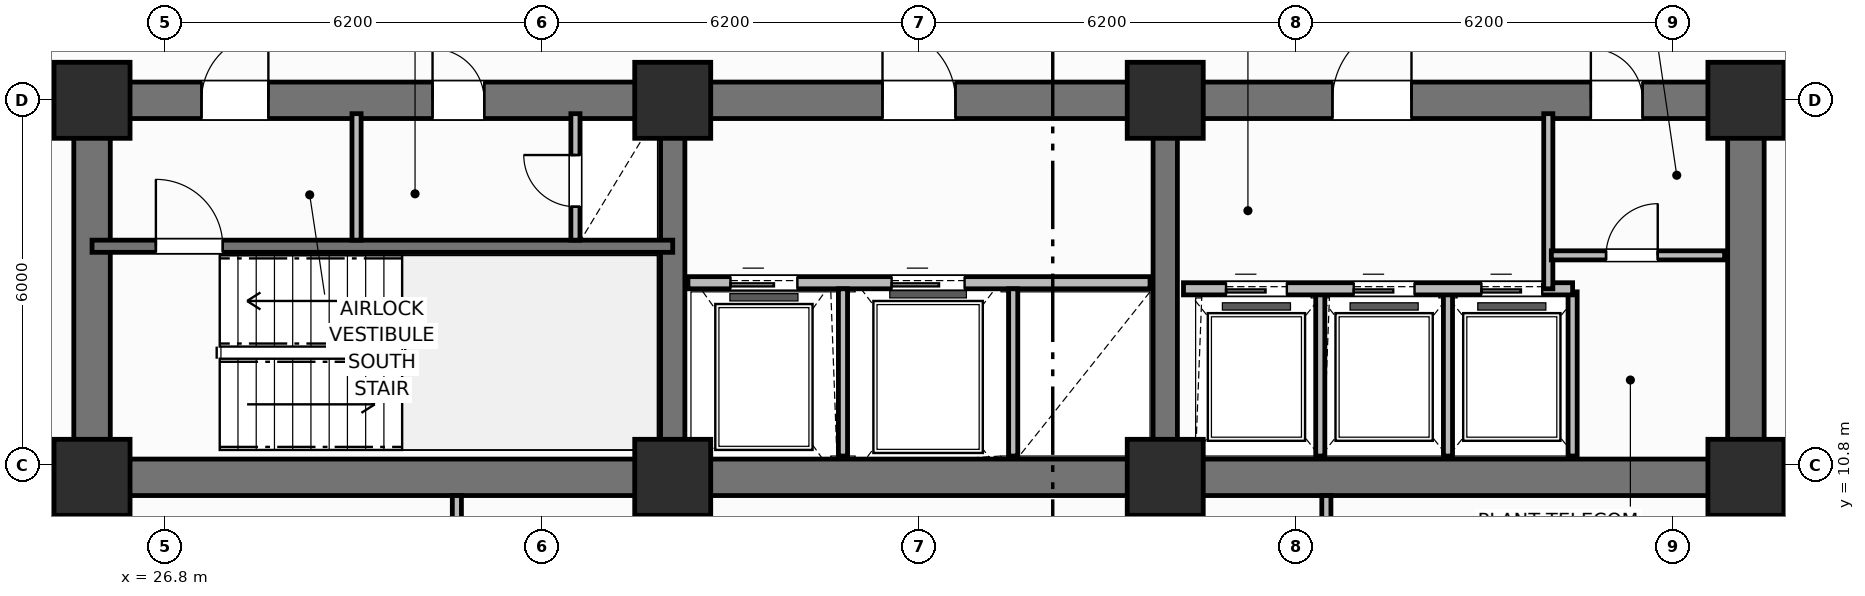
"""IFC4 building model, lengths in metres.
Left out: names, types, materials, properties, quantities, classifications, styles, units other than length and angle.
Written with IfcOpenShell. Run it as: python <this file> out.ifc"""

import sys

from ifc_helpers import new_model, si_unit, direction, frame, frame_2d, origin, origin_2d, place, context, subcontext, project, spatial, rectangle, extrude, element, fill, save


model = new_model("IFC4")
c1 = context("Model", 3, precision=1e-05, world=origin(), true_north=direction((0.0, 1.0)))
c2 = subcontext(c1, "Body", "Model", "MODEL_VIEW")
j1 = project(units=[si_unit("LENGTHUNIT", "METRE"), si_unit("PLANEANGLEUNIT", "RADIAN")], contexts=[c1])
p1 = place(None, origin())
s1 = spatial("IfcSite", under=j1, at=p1, CompositionType="ELEMENT")
p2 = place(p1, origin())
s2 = spatial("IfcBuilding", under=s1, at=p2, CompositionType="ELEMENT")
p3 = place(p2, frame((0.0, 0.0, 54.7)))
s3 = spatial("IfcBuildingStorey", under=s2, at=p3, CompositionType="ELEMENT", Elevation=54.7)
p4 = place(p3, frame((52.8, 10.6, 0.0), z_axis=(0.0, 0.0, 1.0), x_axis=(-1.0, 0.0, 0.0)))
e1 = element("IfcWall", 1, at=p4, inside=s3, PredefinedType="SHEAR", context=c2, shape_type="SweptSolid", body=[
    extrude(rectangle(XDim=27.2, YDim=0.6, at=frame_2d((13.6, 0.0))), origin(), (0.0, 0.0, 1.0), 3.7),
])
for number, where, z_axis, x_axis in (
    (2, (25.6, 10.9, 0.0), (0.0, 0.0, 1.0), (0.0, 1.0, 0.0)),
    (3, (52.8, 10.9, 0.0), (0.0, 0.0, 1.0), (0.0, 1.0, 0.0)),
):
    element("IfcWall", number, at=place(p3, frame(where, z_axis=z_axis, x_axis=x_axis)), inside=s3, PredefinedType="SHEAR", context=c2, shape_type="SweptSolid", body=[
        extrude(rectangle(XDim=5.6, YDim=0.6, at=frame_2d((2.8, 0.0))), origin(), (0.0, 0.0, 1.0), 3.7),
    ])
p5 = place(p3, frame((25.6, 16.8, 0.0), z_axis=(0.0, 0.0, 1.0), x_axis=(1.0, 0.0, 0.0)))
e4 = element("IfcWall", 4, at=p5, inside=s3, PredefinedType="SHEAR", context=c2, shape_type="SweptSolid", body=[
    extrude(rectangle(XDim=27.2, YDim=0.6, at=frame_2d((13.6, 0.0))), origin(), (0.0, 0.0, 1.0), 3.7),
])
p6 = place(p5, frame((1.8, 0.0, 0.0)))
e5 = element("IfcOpeningElement", 5, at=p6, cuts=e4, PredefinedType="OPENING", context=c2, shape_type="SweptSolid", body=[
    extrude(rectangle(XDim=1.1, YDim=2.15, at=frame_2d((0.55, 1.075))), frame((0.0, 0.31, 0.0), z_axis=(0.0, -1.0, 0.0), x_axis=(1.0, 0.0, 0.0)), (0.0, 0.0, 1.0), 0.62),
])
p7 = place(p5, frame((5.6, 0.0, 0.0)))
e6 = element("IfcOpeningElement", 6, at=p7, cuts=e4, PredefinedType="OPENING", context=c2, shape_type="SweptSolid", body=[
    extrude(rectangle(XDim=0.85, YDim=2.1, at=frame_2d((0.425, 1.05))), frame((0.0, 0.31, 0.0), z_axis=(0.0, -1.0, 0.0), x_axis=(1.0, 0.0, 0.0)), (0.0, 0.0, 1.0), 0.62),
])
p8 = place(p5, frame((13.0, 0.0, 0.0)))
e7 = element("IfcOpeningElement", 7, at=p8, cuts=e4, PredefinedType="OPENING", context=c2, shape_type="SweptSolid", body=[
    extrude(rectangle(XDim=1.2, YDim=2.15, at=frame_2d((0.6, 1.075))), frame((0.0, 0.31, 0.0), z_axis=(0.0, -1.0, 0.0), x_axis=(1.0, 0.0, 0.0)), (0.0, 0.0, 1.0), 0.62),
])
p9 = place(p5, frame((20.4, 0.0, 0.0)))
e8 = element("IfcOpeningElement", 8, at=p9, cuts=e4, PredefinedType="OPENING", context=c2, shape_type="SweptSolid", body=[
    extrude(rectangle(XDim=1.3, YDim=2.2, at=frame_2d((0.65, 1.1))), frame((0.0, 0.31, 0.0), z_axis=(0.0, -1.0, 0.0), x_axis=(1.0, 0.0, 0.0)), (0.0, 0.0, 1.0), 0.62),
])
p10 = place(p5, frame((24.65, 0.0, 0.0)))
e9 = element("IfcOpeningElement", 9, at=p10, cuts=e4, PredefinedType="OPENING", context=c2, shape_type="SweptSolid", body=[
    extrude(rectangle(XDim=0.85, YDim=2.1, at=frame_2d((0.425, 1.05))), frame((0.0, 0.31, 0.0), z_axis=(0.0, -1.0, 0.0), x_axis=(1.0, 0.0, 0.0)), (0.0, 0.0, 1.0), 0.62),
])
for number, where, z_axis, x_axis in (
    (10, (35.15, 10.9, 0.0), (0.0, 0.0, 1.0), (0.0, 1.0, 0.0)),
    (11, (43.25, 10.9, 0.0), (0.0, 0.0, 1.0), (0.0, 1.0, 0.0)),
):
    element("IfcWall", number, at=place(p3, frame(where, z_axis=z_axis, x_axis=x_axis)), inside=s3, PredefinedType="SHEAR", context=c2, shape_type="SweptSolid", body=[
        extrude(rectangle(XDim=5.6, YDim=0.4, at=frame_2d((2.8, 0.0))), origin(), (0.0, 0.0, 1.0), 3.7),
    ])
for number, where, z_axis, x_axis in (
    (12, (25.6, 10.6, 0.0), (0.0, 0.0, 1.0), (1.0, 0.0, 0.0)),
    (13, (25.6, 16.8, 0.0), (0.0, 0.0, 1.0), (1.0, 0.0, 0.0)),
    (14, (35.15, 10.6, 0.0), (0.0, 0.0, 1.0), (1.0, 0.0, 0.0)),
    (15, (35.15, 16.8, 0.0), (0.0, 0.0, 1.0), (1.0, 0.0, 0.0)),
    (16, (43.25, 10.6, 0.0), (0.0, 0.0, 1.0), (1.0, 0.0, 0.0)),
    (17, (43.25, 16.8, 0.0), (0.0, 0.0, 1.0), (1.0, 0.0, 0.0)),
    (18, (52.8, 10.6, 0.0), (0.0, 0.0, 1.0), (1.0, 0.0, 0.0)),
    (19, (52.8, 16.8, 0.0), (0.0, 0.0, 1.0), (1.0, 0.0, 0.0)),
):
    element("IfcColumn", number, at=place(p3, frame(where, z_axis=z_axis, x_axis=x_axis)), inside=s3, PredefinedType="COLUMN", context=c2, shape_type="SweptSolid", body=[
        extrude(rectangle(XDim=1.25, YDim=1.25, at=origin_2d()), origin(), (0.0, 0.0, 1.0), 3.7),
    ])
p11 = place(p3, frame((25.6, 14.4, 0.0), z_axis=(0.0, 0.0, 1.0), x_axis=(1.0, 0.0, 0.0)))
e20 = element("IfcWall", 20, at=p11, inside=s3, PredefinedType="SHEAR", context=c2, shape_type="SweptSolid", body=[
    extrude(rectangle(XDim=9.55, YDim=0.2, at=frame_2d((4.775, 0.0))), origin(), (0.0, 0.0, 1.0), 3.7),
])
p12 = place(p11, frame((1.05, 0.0, 0.0)))
e21 = element("IfcOpeningElement", 21, at=p12, cuts=e20, PredefinedType="OPENING", context=c2, shape_type="SweptSolid", body=[
    extrude(rectangle(XDim=1.1, YDim=2.15, at=frame_2d((0.55, 1.075))), frame((0.0, 0.11, 0.0), z_axis=(0.0, -1.0, 0.0), x_axis=(1.0, 0.0, 0.0)), (0.0, 0.0, 1.0), 0.22),
])
p13 = place(p3, frame((29.95, 14.5, 0.0), z_axis=(0.0, 0.0, 1.0), x_axis=(0.0, 1.0, 0.0)))
e22 = element("IfcWall", 22, at=p13, inside=s3, PredefinedType="PARTITIONING", context=c2, shape_type="SweptSolid", body=[
    extrude(rectangle(XDim=2.08, YDim=0.15, at=frame_2d((1.04, 0.0))), origin(), (0.0, 0.0, 1.0), 2.53),
])
p14 = place(p3, frame((33.55, 14.5, 0.0), z_axis=(0.0, 0.0, 1.0), x_axis=(0.0, 1.0, 0.0)))
e23 = element("IfcWall", 23, at=p14, inside=s3, PredefinedType="PARTITIONING", context=c2, shape_type="SweptSolid", body=[
    extrude(rectangle(XDim=2.08, YDim=0.15, at=frame_2d((1.04, 0.0))), origin(), (0.0, 0.0, 1.0), 2.53),
])
p15 = place(p14, frame((0.55, 0.0, 0.0)))
e24 = element("IfcOpeningElement", 24, at=p15, cuts=e23, PredefinedType="OPENING", context=c2, shape_type="SweptSolid", body=[
    extrude(rectangle(XDim=0.85, YDim=2.05, at=frame_2d((0.425, 1.025))), frame((0.0, 0.085, 0.0), z_axis=(0.0, -1.0, 0.0), x_axis=(1.0, 0.0, 0.0)), (0.0, 0.0, 1.0), 0.17),
])
p16 = place(p3, frame((35.4, 13.8, 0.0), z_axis=(0.0, 0.0, 1.0), x_axis=(1.0, 0.0, 0.0)))
e25 = element("IfcWall", 25, at=p16, inside=s3, PredefinedType="PARTITIONING", context=c2, shape_type="SweptSolid", body=[
    extrude(rectangle(XDim=7.6, YDim=0.2, at=frame_2d((3.8, 0.0))), origin(), (0.0, 0.0, 1.0), 2.3),
])
p17 = place(p16, frame((0.7, 0.0, 0.0)))
e26 = element("IfcOpeningElement", 26, at=p17, cuts=e25, PredefinedType="OPENING", context=c2, shape_type="SweptSolid", body=[
    extrude(rectangle(XDim=1.1, YDim=2.15, at=frame_2d((0.55, 1.075))), frame((0.0, 0.11, 0.0), z_axis=(0.0, -1.0, 0.0), x_axis=(1.0, 0.0, 0.0)), (0.0, 0.0, 1.0), 0.22),
])
p18 = place(p16, frame((3.35, 0.0, 0.0)))
e27 = element("IfcOpeningElement", 27, at=p18, cuts=e25, PredefinedType="OPENING", context=c2, shape_type="SweptSolid", body=[
    extrude(rectangle(XDim=1.2, YDim=2.15, at=frame_2d((0.6, 1.075))), frame((0.0, 0.11, 0.0), z_axis=(0.0, -1.0, 0.0), x_axis=(1.0, 0.0, 0.0)), (0.0, 0.0, 1.0), 0.22),
])
for number, where, z_axis, x_axis in (
    (28, (37.95, 10.95, 0.0), (0.0, 0.0, 1.0), (0.0, 1.0, 0.0)),
    (29, (40.75, 10.95, 0.0), (0.0, 0.0, 1.0), (0.0, 1.0, 0.0)),
):
    element("IfcWall", number, at=place(p3, frame(where, z_axis=z_axis, x_axis=x_axis)), inside=s3, PredefinedType="PARTITIONING", context=c2, shape_type="SweptSolid", body=[
        extrude(rectangle(XDim=2.75, YDim=0.15, at=frame_2d((1.375, 0.0))), origin(), (0.0, 0.0, 1.0), 2.53),
    ])
for number, where, z_axis, x_axis in (
    (30, (45.8, 10.95, 0.0), (0.0, 0.0, 1.0), (0.0, 1.0, 0.0)),
    (31, (47.9, 10.95, 0.0), (0.0, 0.0, 1.0), (0.0, 1.0, 0.0)),
    (32, (49.95, 10.95, 0.0), (0.0, 0.0, 1.0), (0.0, 1.0, 0.0)),
):
    element("IfcWall", number, at=place(p3, frame(where, z_axis=z_axis, x_axis=x_axis)), inside=s3, PredefinedType="PARTITIONING", context=c2, shape_type="SweptSolid", body=[
        extrude(rectangle(XDim=2.7, YDim=0.15, at=frame_2d((1.35, 0.0))), origin(), (0.0, 0.0, 1.0), 2.53),
    ])
p19 = place(p3, frame((43.55, 13.7, 0.0), z_axis=(0.0, 0.0, 1.0), x_axis=(1.0, 0.0, 0.0)))
e33 = element("IfcWall", 33, at=p19, inside=s3, PredefinedType="PARTITIONING", context=c2, shape_type="SweptSolid", body=[
    extrude(rectangle(XDim=6.4, YDim=0.2, at=frame_2d((3.2, 0.0))), origin(), (0.0, 0.0, 1.0), 2.53),
])
p20 = place(p19, frame((0.7, 0.0, 0.0)))
e34 = element("IfcOpeningElement", 34, at=p20, cuts=e33, PredefinedType="OPENING", context=c2, shape_type="SweptSolid", body=[
    extrude(rectangle(XDim=1.0, YDim=2.15, at=frame_2d((0.5, 1.075))), frame((0.0, 0.11, 0.0), z_axis=(0.0, -1.0, 0.0), x_axis=(1.0, 0.0, 0.0)), (0.0, 0.0, 1.0), 0.22),
])
p21 = place(p19, frame((2.8, 0.0, 0.0)))
e35 = element("IfcOpeningElement", 35, at=p21, cuts=e33, PredefinedType="OPENING", context=c2, shape_type="SweptSolid", body=[
    extrude(rectangle(XDim=1.0, YDim=2.15, at=frame_2d((0.5, 1.075))), frame((0.0, 0.11, 0.0), z_axis=(0.0, -1.0, 0.0), x_axis=(1.0, 0.0, 0.0)), (0.0, 0.0, 1.0), 0.22),
])
p22 = place(p19, frame((4.9, 0.0, 0.0)))
e36 = element("IfcOpeningElement", 36, at=p22, cuts=e33, PredefinedType="OPENING", context=c2, shape_type="SweptSolid", body=[
    extrude(rectangle(XDim=1.0, YDim=2.15, at=frame_2d((0.5, 1.075))), frame((0.0, 0.11, 0.0), z_axis=(0.0, -1.0, 0.0), x_axis=(1.0, 0.0, 0.0)), (0.0, 0.0, 1.0), 0.22),
])
p23 = place(p3, frame((49.55, 13.7, 0.0), z_axis=(0.0, 0.0, 1.0), x_axis=(0.0, 1.0, 0.0)))
e37 = element("IfcWall", 37, at=p23, inside=s3, PredefinedType="PARTITIONING", context=c2, shape_type="SweptSolid", body=[
    extrude(rectangle(XDim=2.88, YDim=0.15, at=frame_2d((1.44, 0.0))), origin(), (0.0, 0.0, 1.0), 2.53),
])
p24 = place(p3, frame((49.6, 14.25, 0.0), z_axis=(0.0, 0.0, 1.0), x_axis=(1.0, 0.0, 0.0)))
e38 = element("IfcWall", 38, at=p24, inside=s3, PredefinedType="PARTITIONING", context=c2, shape_type="SweptSolid", body=[
    extrude(rectangle(XDim=2.85, YDim=0.15, at=frame_2d((1.425, 0.0))), origin(), (0.0, 0.0, 1.0), 2.53),
])
p25 = place(p24, frame((0.9, 0.0, 0.0)))
e39 = element("IfcOpeningElement", 39, at=p25, cuts=e38, PredefinedType="OPENING", context=c2, shape_type="SweptSolid", body=[
    extrude(rectangle(XDim=0.85, YDim=2.1, at=frame_2d((0.425, 1.05))), frame((0.0, 0.085, 0.0), z_axis=(0.0, -1.0, 0.0), x_axis=(1.0, 0.0, 0.0)), (0.0, 0.0, 1.0), 0.17),
])
p26 = place(p3, frame((31.6, 4.97, 0.0), z_axis=(0.0, 0.0, 1.0), x_axis=(0.0, 1.0, 0.0)))
e40 = element("IfcWall", 40, at=p26, inside=s3, PredefinedType="PARTITIONING", context=c2, shape_type="SweptSolid", body=[
    extrude(rectangle(XDim=5.33, YDim=0.15, at=frame_2d((2.665, 0.0))), origin(), (0.0, 0.0, 1.0), 2.53),
])
p27 = place(p26, frame((1.95, 0.0, 0.0)))
e41 = element("IfcOpeningElement", 41, at=p27, cuts=e40, PredefinedType="OPENING", context=c2, shape_type="SweptSolid", body=[
    extrude(rectangle(XDim=0.9, YDim=2.1, at=frame_2d((0.45, 1.05))), frame((0.0, 0.085, 0.0), z_axis=(0.0, -1.0, 0.0), x_axis=(1.0, 0.0, 0.0)), (0.0, 0.0, 1.0), 0.17),
])
p28 = place(p3, frame((45.9, 4.97, 0.0), z_axis=(0.0, 0.0, 1.0), x_axis=(0.0, 1.0, 0.0)))
e42 = element("IfcWall", 42, at=p28, inside=s3, PredefinedType="PARTITIONING", context=c2, shape_type="SweptSolid", body=[
    extrude(rectangle(XDim=5.33, YDim=0.15, at=frame_2d((2.665, 0.0))), origin(), (0.0, 0.0, 1.0), 2.53),
])
p29 = place(p3, frame((25.4, 6.27, 0.0), z_axis=(0.0, 0.0, 1.0), x_axis=(0.0, 1.0, 0.0)))
e43 = element("IfcWall", 43, at=p29, inside=s3, PredefinedType="PARTITIONING", context=c2, shape_type="SweptSolid", body=[
    extrude(rectangle(XDim=4.03, YDim=0.2, at=frame_2d((2.015, 0.0))), origin(), (0.0, 0.0, 1.0), 2.53),
])
p30 = place(p29, frame((0.65, 0.0, 0.0)))
e44 = element("IfcOpeningElement", 44, at=p30, cuts=e43, PredefinedType="OPENING", context=c2, shape_type="SweptSolid", body=[
    extrude(rectangle(XDim=0.9, YDim=2.1, at=frame_2d((0.45, 1.05))), frame((0.0, 0.11, 0.0), z_axis=(0.0, -1.0, 0.0), x_axis=(1.0, 0.0, 0.0)), (0.0, 0.0, 1.0), 0.22),
])
p31 = place(p3, frame((53.0, 6.27, 0.0), z_axis=(0.0, 0.0, 1.0), x_axis=(0.0, 1.0, 0.0)))
e45 = element("IfcWall", 45, at=p31, inside=s3, PredefinedType="PARTITIONING", context=c2, shape_type="SweptSolid", body=[
    extrude(rectangle(XDim=4.03, YDim=0.2, at=frame_2d((2.015, 0.0))), origin(), (0.0, 0.0, 1.0), 2.53),
])
p32 = place(p31, frame((0.65, 0.0, 0.0)))
e46 = element("IfcOpeningElement", 46, at=p32, cuts=e45, PredefinedType="OPENING", context=c2, shape_type="SweptSolid", body=[
    extrude(rectangle(XDim=0.9, YDim=2.1, at=frame_2d((0.45, 1.05))), frame((0.0, 0.11, 0.0), z_axis=(0.0, -1.0, 0.0), x_axis=(1.0, 0.0, 0.0)), (0.0, 0.0, 1.0), 0.22),
])
p33 = place(p12, origin())
e47 = element("IfcDoor", 47, at=p33, inside=s3, OperationType="SINGLE_SWING_LEFT", PredefinedType="DOOR", context=c2, shape_type="SweptSolid", body=[
    extrude(rectangle(XDim=1.1, YDim=2.15, at=frame_2d((0.55, 1.075))), frame((0.0, 0.025, 0.0), z_axis=(0.0, -1.0, 0.0), x_axis=(1.0, 0.0, 0.0)), (0.0, 0.0, 1.0), 0.05),
])
fill(e21, e47)
p34 = place(p15, origin())
e48 = element("IfcDoor", 48, at=p34, inside=s3, OperationType="SINGLE_SWING_RIGHT", PredefinedType="TRAPDOOR", context=c2, shape_type="SweptSolid", body=[
    extrude(rectangle(XDim=0.85, YDim=2.05, at=frame_2d((0.425, 1.025))), frame((0.0, 0.025, 0.0), z_axis=(0.0, -1.0, 0.0), x_axis=(1.0, 0.0, 0.0)), (0.0, 0.0, 1.0), 0.05),
])
fill(e24, e48)
p35 = place(p17, origin())
e49 = element("IfcDoor", 49, at=p35, inside=s3, OperationType="SLIDING_TO_LEFT", PredefinedType="DOOR", context=c2, shape_type="SweptSolid", body=[
    extrude(rectangle(XDim=1.1, YDim=2.15, at=frame_2d((0.55, 1.075))), frame((0.0, 0.025, 0.0), z_axis=(0.0, -1.0, 0.0), x_axis=(1.0, 0.0, 0.0)), (0.0, 0.0, 1.0), 0.05),
])
fill(e26, e49)
p36 = place(p18, origin())
e50 = element("IfcDoor", 50, at=p36, inside=s3, OperationType="SLIDING_TO_LEFT", PredefinedType="DOOR", context=c2, shape_type="SweptSolid", body=[
    extrude(rectangle(XDim=1.2, YDim=2.15, at=frame_2d((0.6, 1.075))), frame((0.0, 0.025, 0.0), z_axis=(0.0, -1.0, 0.0), x_axis=(1.0, 0.0, 0.0)), (0.0, 0.0, 1.0), 0.05),
])
fill(e27, e50)
p37 = place(p20, origin())
e51 = element("IfcDoor", 51, at=p37, inside=s3, OperationType="SLIDING_TO_LEFT", PredefinedType="DOOR", context=c2, shape_type="SweptSolid", body=[
    extrude(rectangle(XDim=1.0, YDim=2.15, at=frame_2d((0.5, 1.075))), frame((0.0, 0.025, 0.0), z_axis=(0.0, -1.0, 0.0), x_axis=(1.0, 0.0, 0.0)), (0.0, 0.0, 1.0), 0.05),
])
fill(e34, e51)
p38 = place(p21, origin())
e52 = element("IfcDoor", 52, at=p38, inside=s3, OperationType="SLIDING_TO_LEFT", PredefinedType="DOOR", context=c2, shape_type="SweptSolid", body=[
    extrude(rectangle(XDim=1.0, YDim=2.15, at=frame_2d((0.5, 1.075))), frame((0.0, 0.025, 0.0), z_axis=(0.0, -1.0, 0.0), x_axis=(1.0, 0.0, 0.0)), (0.0, 0.0, 1.0), 0.05),
])
fill(e35, e52)
p39 = place(p22, origin())
e53 = element("IfcDoor", 53, at=p39, inside=s3, OperationType="SLIDING_TO_LEFT", PredefinedType="DOOR", context=c2, shape_type="SweptSolid", body=[
    extrude(rectangle(XDim=1.0, YDim=2.15, at=frame_2d((0.5, 1.075))), frame((0.0, 0.025, 0.0), z_axis=(0.0, -1.0, 0.0), x_axis=(1.0, 0.0, 0.0)), (0.0, 0.0, 1.0), 0.05),
])
fill(e36, e53)
p40 = place(p25, origin())
e54 = element("IfcDoor", 54, at=p40, inside=s3, OperationType="SINGLE_SWING_RIGHT", PredefinedType="DOOR", context=c2, shape_type="SweptSolid", body=[
    extrude(rectangle(XDim=0.85, YDim=2.1, at=frame_2d((0.425, 1.05))), frame((0.0, 0.025, 0.0), z_axis=(0.0, -1.0, 0.0), x_axis=(1.0, 0.0, 0.0)), (0.0, 0.0, 1.0), 0.05),
])
fill(e39, e54)
p41 = place(p6, origin())
e55 = element("IfcDoor", 55, at=p41, inside=s3, OperationType="SINGLE_SWING_RIGHT", PredefinedType="DOOR", context=c2, shape_type="SweptSolid", body=[
    extrude(rectangle(XDim=1.1, YDim=2.15, at=frame_2d((0.55, 1.075))), frame((0.0, 0.025, 0.0), z_axis=(0.0, -1.0, 0.0), x_axis=(1.0, 0.0, 0.0)), (0.0, 0.0, 1.0), 0.05),
])
fill(e5, e55)
p42 = place(p7, origin())
e56 = element("IfcDoor", 56, at=p42, inside=s3, OperationType="SINGLE_SWING_LEFT", PredefinedType="DOOR", context=c2, shape_type="SweptSolid", body=[
    extrude(rectangle(XDim=0.85, YDim=2.1, at=frame_2d((0.425, 1.05))), frame((0.0, 0.025, 0.0), z_axis=(0.0, -1.0, 0.0), x_axis=(1.0, 0.0, 0.0)), (0.0, 0.0, 1.0), 0.05),
])
fill(e6, e56)
p43 = place(p8, origin())
e57 = element("IfcDoor", 57, at=p43, inside=s3, OperationType="SINGLE_SWING_LEFT", PredefinedType="DOOR", context=c2, shape_type="SweptSolid", body=[
    extrude(rectangle(XDim=1.2, YDim=2.15, at=frame_2d((0.6, 1.075))), frame((0.0, 0.025, 0.0), z_axis=(0.0, -1.0, 0.0), x_axis=(1.0, 0.0, 0.0)), (0.0, 0.0, 1.0), 0.05),
])
fill(e7, e57)
p44 = place(p9, origin())
e58 = element("IfcDoor", 58, at=p44, inside=s3, OperationType="SINGLE_SWING_RIGHT", PredefinedType="DOOR", context=c2, shape_type="SweptSolid", body=[
    extrude(rectangle(XDim=1.3, YDim=2.2, at=frame_2d((0.65, 1.1))), frame((0.0, 0.025, 0.0), z_axis=(0.0, -1.0, 0.0), x_axis=(1.0, 0.0, 0.0)), (0.0, 0.0, 1.0), 0.05),
])
fill(e8, e58)
p45 = place(p10, origin())
e59 = element("IfcDoor", 59, at=p45, inside=s3, OperationType="SINGLE_SWING_LEFT", PredefinedType="DOOR", context=c2, shape_type="SweptSolid", body=[
    extrude(rectangle(XDim=0.85, YDim=2.1, at=frame_2d((0.425, 1.05))), frame((0.0, 0.025, 0.0), z_axis=(0.0, -1.0, 0.0), x_axis=(1.0, 0.0, 0.0)), (0.0, 0.0, 1.0), 0.05),
])
fill(e9, e59)
save(model, sys.argv[1])
